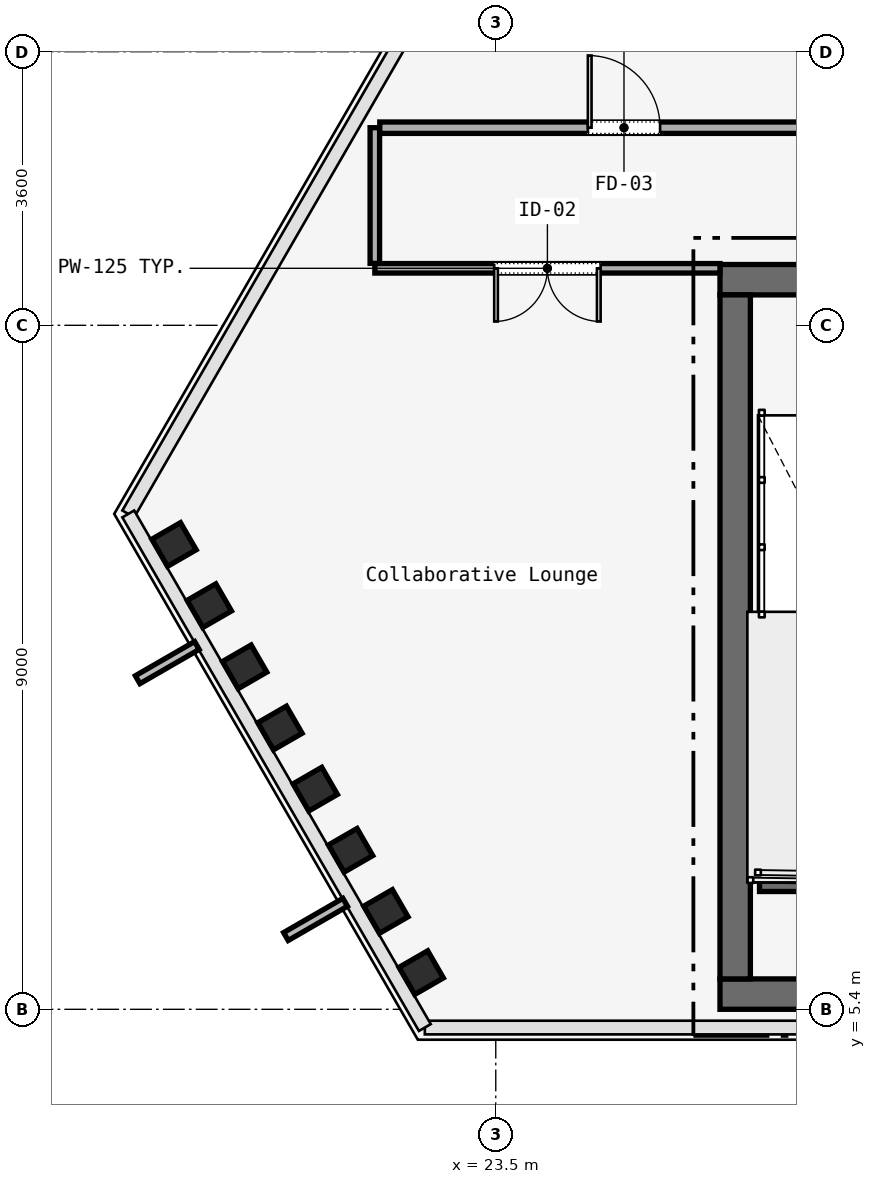
"""IFC4 building model, lengths in metres.
Left out: names, types, materials, properties, quantities, classifications, styles, units other than length and angle.
Written with IfcOpenShell. Run it as: python <this file> out.ifc"""

import sys

from ifc_helpers import new_model, si_unit, direction, frame, frame_2d, origin, origin_2d, place, context, subcontext, project, spatial, rectangle, i_section, extrude, element, fill, save


model = new_model("IFC4")
c1 = context("Model", 3, precision=1e-05, world=origin(), true_north=direction((0.0, 1.0)))
c2 = subcontext(c1, "Body", "Model", "MODEL_VIEW")
j1 = project(units=[si_unit("LENGTHUNIT", "METRE"), si_unit("PLANEANGLEUNIT", "RADIAN")], contexts=[c1])
p1 = place(None, origin())
s1 = spatial("IfcSite", under=j1, at=p1, CompositionType="ELEMENT")
p2 = place(p1, origin())
s2 = spatial("IfcBuilding", under=s1, at=p2, CompositionType="ELEMENT")
p3 = place(p2, frame((0.0, 0.0, 218.0)))
s3 = spatial("IfcBuildingStorey", under=s2, at=p3, CompositionType="ELEMENT", Elevation=218.0)
p4 = place(p3, frame((26.45, 15.0, 0.0), z_axis=(0.0, 0.0, 1.0), x_axis=(1.0, 0.0, 0.0)))
e1 = element("IfcWall", 1, at=p4, inside=s3, PredefinedType="SOLIDWALL", context=c2, shape_type="SweptSolid", body=[
    extrude(rectangle(XDim=31.1, YDim=0.4, at=frame_2d((15.55, 0.0))), origin(), (0.0, 0.0, 1.0), 3.58),
])
p5 = place(p4, frame((1.65, 0.0, 0.0)))
e2 = element("IfcOpeningElement", 2, at=p5, cuts=e1, PredefinedType="OPENING", context=c2, shape_type="SweptSolid", body=[
    extrude(rectangle(XDim=1.1, YDim=2.2, at=frame_2d((0.55, 1.1))), frame((0.0, 0.2, 0.0), z_axis=(0.0, -1.0, 0.0), x_axis=(1.0, 0.0, 0.0)), (0.0, 0.0, 1.0), 0.4),
])
p6 = place(p4, frame((13.65, 0.0, 0.0)))
e3 = element("IfcOpeningElement", 3, at=p6, cuts=e1, PredefinedType="OPENING", context=c2, shape_type="SweptSolid", body=[
    extrude(rectangle(XDim=1.1, YDim=2.2, at=frame_2d((0.55, 1.1))), frame((0.0, 0.2, 0.0), z_axis=(0.0, -1.0, 0.0), x_axis=(1.0, 0.0, 0.0)), (0.0, 0.0, 1.0), 0.4),
])
p7 = place(p4, frame((25.55, 0.0, 0.0)))
e4 = element("IfcOpeningElement", 4, at=p7, cuts=e1, PredefinedType="OPENING", context=c2, shape_type="SweptSolid", body=[
    extrude(rectangle(XDim=1.1, YDim=2.2, at=frame_2d((0.55, 1.1))), frame((0.0, 0.2, 0.0), z_axis=(0.0, -1.0, 0.0), x_axis=(1.0, 0.0, 0.0)), (0.0, 0.0, 1.0), 0.4),
])
p8 = place(p4, frame((19.35, 0.0, 0.0)))
e5 = element("IfcOpeningElement", 5, at=p8, cuts=e1, PredefinedType="OPENING", context=c2, shape_type="SweptSolid", body=[
    extrude(rectangle(XDim=1.1, YDim=2.2, at=frame_2d((0.55, 1.1))), frame((0.0, 0.2, 0.0), z_axis=(0.0, -1.0, 0.0), x_axis=(1.0, 0.0, 0.0)), (0.0, 0.0, 1.0), 0.4),
])
p9 = place(p4, frame((21.4, 0.0, 0.0)))
e6 = element("IfcOpeningElement", 6, at=p9, cuts=e1, PredefinedType="OPENING", context=c2, shape_type="SweptSolid", body=[
    extrude(rectangle(XDim=0.9, YDim=2.1, at=frame_2d((0.45, 1.05))), frame((0.0, 0.2, 0.0), z_axis=(0.0, -1.0, 0.0), x_axis=(1.0, 0.0, 0.0)), (0.0, 0.0, 1.0), 0.4),
])
p10 = place(p4, frame((5.14, 0.0, 0.0)))
e7 = element("IfcOpeningElement", 7, at=p10, cuts=e1, PredefinedType="OPENING", context=c2, shape_type="SweptSolid", body=[
    extrude(rectangle(XDim=0.95, YDim=2.2, at=frame_2d((0.475, 1.1))), frame((0.0, 0.2, 0.0), z_axis=(0.0, -1.0, 0.0), x_axis=(1.0, 0.0, 0.0)), (0.0, 0.0, 1.0), 0.4),
])
p11 = place(p4, frame((7.825, 0.0, 0.0)))
e8 = element("IfcOpeningElement", 8, at=p11, cuts=e1, PredefinedType="OPENING", context=c2, shape_type="SweptSolid", body=[
    extrude(rectangle(XDim=0.95, YDim=2.2, at=frame_2d((0.475, 1.1))), frame((0.0, 0.2, 0.0), z_axis=(0.0, -1.0, 0.0), x_axis=(1.0, 0.0, 0.0)), (0.0, 0.0, 1.0), 0.4),
])
p12 = place(p4, frame((10.46, 0.0, 0.0)))
e9 = element("IfcOpeningElement", 9, at=p12, cuts=e1, PredefinedType="OPENING", context=c2, shape_type="SweptSolid", body=[
    extrude(rectangle(XDim=0.95, YDim=2.2, at=frame_2d((0.475, 1.1))), frame((0.0, 0.2, 0.0), z_axis=(0.0, -1.0, 0.0), x_axis=(1.0, 0.0, 0.0)), (0.0, 0.0, 1.0), 0.4),
])
p13 = place(p4, frame((23.35, 0.0, 0.0)))
e10 = element("IfcOpeningElement", 10, at=p13, cuts=e1, PredefinedType="OPENING", context=c2, shape_type="SweptSolid", body=[
    extrude(rectangle(XDim=1.3, YDim=2.3, at=frame_2d((0.65, 1.15))), frame((0.0, 0.2, 0.0), z_axis=(0.0, -1.0, 0.0), x_axis=(1.0, 0.0, 0.0)), (0.0, 0.0, 1.0), 0.4),
])
p14 = place(p3, frame((26.45, 5.6, 0.0), z_axis=(0.0, 0.0, 1.0), x_axis=(1.0, 0.0, 0.0)))
e11 = element("IfcWall", 11, at=p14, inside=s3, PredefinedType="SOLIDWALL", context=c2, shape_type="SweptSolid", body=[
    extrude(rectangle(XDim=31.1, YDim=0.4, at=frame_2d((15.55, 0.0))), origin(), (0.0, 0.0, 1.0), 3.58),
])
p15 = place(p3, frame((26.65, 5.8, 0.0), z_axis=(0.0, 0.0, 1.0), x_axis=(0.0, 1.0, 0.0)))
e12 = element("IfcWall", 12, at=p15, inside=s3, PredefinedType="SOLIDWALL", context=c2, shape_type="SweptSolid", body=[
    extrude(rectangle(XDim=9.0, YDim=0.4, at=frame_2d((4.5, 0.0))), origin(), (0.0, 0.0, 1.0), 3.58),
])
for number, where, z_axis, x_axis in (
    (13, (19.267, 11.516, 0.0), (0.0, 0.0, 1.0), (-0.5, 0.866, 0.0)),
    (14, (19.731, 10.711, 0.0), (0.0, 0.0, 1.0), (-0.5, 0.866, 0.0)),
    (15, (20.196, 9.906, 0.0), (0.0, 0.0, 1.0), (-0.5, 0.866, 0.0)),
    (16, (20.661, 9.102, 0.0), (0.0, 0.0, 1.0), (-0.5, 0.866, 0.0)),
    (17, (21.125, 8.297, 0.0), (0.0, 0.0, 1.0), (-0.5, 0.866, 0.0)),
    (18, (21.59, 7.492, 0.0), (0.0, 0.0, 1.0), (-0.5, 0.866, 0.0)),
    (19, (22.054, 6.687, 0.0), (0.0, 0.0, 1.0), (-0.5, 0.866, 0.0)),
    (20, (22.519, 5.882, 0.0), (0.0, 0.0, 1.0), (-0.5, 0.866, 0.0)),
):
    element("IfcColumn", number, at=place(p3, frame(where, z_axis=z_axis, x_axis=x_axis)), inside=s3, PredefinedType="COLUMN", context=c2, shape_type="SweptSolid", body=[
        extrude(i_section(OverallWidth=0.412, OverallDepth=0.435, WebThickness=0.036, FlangeThickness=0.044, FilletRadius=0.015, at=origin_2d()), origin(), (0.0, 0.0, 1.0), 3.58),
    ])
p16 = place(p3, frame((26.97, 7.05, 0.0), z_axis=(0.0, 0.0, 1.0), x_axis=(1.0, 0.0, 0.0)))
e21 = element("IfcWall", 21, at=p16, inside=s3, PredefinedType="SOLIDWALL", context=c2, shape_type="SweptSolid", body=[
    extrude(rectangle(XDim=3.115, YDim=0.2, at=frame_2d((1.558, 0.0))), origin(), (0.0, 0.0, 1.0), 3.8),
])
p17 = place(p3, frame((26.45, 15.15, 0.0), z_axis=(0.0, 0.0, 1.0), x_axis=(-1.0, 0.0, 0.0)))
e22 = element("IfcWall", 22, at=p17, inside=s3, PredefinedType="PARTITIONING", context=c2, shape_type="SweptSolid", body=[
    extrude(rectangle(XDim=4.541, YDim=0.125, at=frame_2d((2.271, 0.0))), origin(), (0.0, 0.0, 1.0), 3.01),
])
p18 = place(p17, frame((1.571, 0.0, 0.0)))
e23 = element("IfcOpeningElement", 23, at=p18, cuts=e22, PredefinedType="OPENING", context=c2, shape_type="SweptSolid", body=[
    extrude(rectangle(XDim=1.4, YDim=2.2, at=frame_2d((0.7, 1.1))), frame((0.0, 0.062, 0.0), z_axis=(0.0, -1.0, 0.0), x_axis=(1.0, 0.0, 0.0)), (0.0, 0.0, 1.0), 0.125),
])
p19 = place(p3, frame((21.909, 15.215, 0.0), z_axis=(0.0, 0.0, 1.0), x_axis=(0.0, 1.0, 0.0)))
e24 = element("IfcWall", 24, at=p19, inside=s3, PredefinedType="PARTITIONING", context=c2, shape_type="SweptSolid", body=[
    extrude(rectangle(XDim=1.785, YDim=0.125, at=frame_2d((0.893, 0.0))), origin(), (0.0, 0.0, 1.0), 3.01),
])
p20 = place(p3, frame((21.974, 17.0, 0.0), z_axis=(0.0, 0.0, 1.0), x_axis=(1.0, 0.0, 0.0)))
e25 = element("IfcWall", 25, at=p20, inside=s3, PredefinedType="PARTITIONING", context=c2, shape_type="SweptSolid", body=[
    extrude(rectangle(XDim=6.426, YDim=0.15, at=frame_2d((3.213, 0.0))), origin(), (0.0, 0.0, 1.0), 3.01),
])
p21 = place(p20, frame((2.738, 0.0, 0.0)))
e26 = element("IfcOpeningElement", 26, at=p21, cuts=e25, PredefinedType="OPENING", context=c2, shape_type="SweptSolid", body=[
    extrude(rectangle(XDim=0.95, YDim=2.2, at=frame_2d((0.475, 1.1))), frame((0.0, 0.075, 0.0), z_axis=(0.0, -1.0, 0.0), x_axis=(1.0, 0.0, 0.0)), (0.0, 0.0, 1.0), 0.15),
])
p22 = place(p18, origin())
e27 = element("IfcDoor", 27, at=p22, inside=s3, OperationType="SINGLE_SWING_LEFT", PredefinedType="DOOR", context=c2, shape_type="SweptSolid", body=[
    extrude(rectangle(XDim=1.4, YDim=2.2, at=frame_2d((0.7, 1.1))), frame((0.0, 0.025, 0.0), z_axis=(0.0, -1.0, 0.0), x_axis=(1.0, 0.0, 0.0)), (0.0, 0.0, 1.0), 0.05),
])
fill(e23, e27)
p23 = place(p21, origin())
e28 = element("IfcDoor", 28, at=p23, inside=s3, OperationType="SINGLE_SWING_RIGHT", PredefinedType="DOOR", context=c2, shape_type="SweptSolid", body=[
    extrude(rectangle(XDim=0.95, YDim=2.2, at=frame_2d((0.475, 1.1))), frame((0.0, 0.025, 0.0), z_axis=(0.0, -1.0, 0.0), x_axis=(1.0, 0.0, 0.0)), (0.0, 0.0, 1.0), 0.05),
])
fill(e26, e28)
save(model, sys.argv[1])
